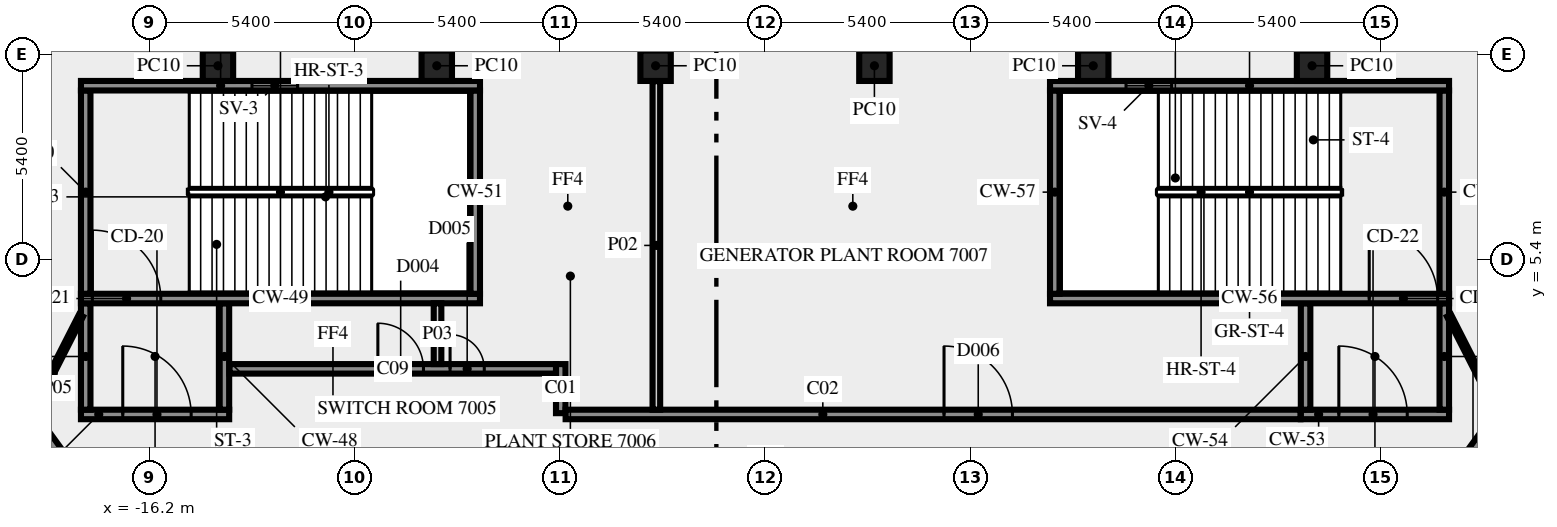
"""IFC4 building model, lengths in metres.
Left out: names, types, materials, properties, quantities, classifications, styles, units other than length and angle.
Written with IfcOpenShell. Run it as: python <this file> out.ifc"""

import sys

from ifc_helpers import new_model, si_unit, direction, frame, frame_2d, origin, origin_2d, place, context, subcontext, project, spatial, rectangle, extrude, element, fill, save


model = new_model("IFC4")
c1 = context("Model", 3, precision=1e-05, world=origin(), true_north=direction((0.0, 1.0)))
c2 = subcontext(c1, "Body", "Model", "MODEL_VIEW")
j1 = project(units=[si_unit("LENGTHUNIT", "METRE"), si_unit("PLANEANGLEUNIT", "RADIAN")], contexts=[c1])
p1 = place(None, origin())
s1 = spatial("IfcSite", under=j1, at=p1, CompositionType="ELEMENT")
p2 = place(p1, origin())
s2 = spatial("IfcBuilding", under=s1, at=p2, CompositionType="ELEMENT")
p3 = place(p2, frame((0.0, 0.0, 301.0)))
s3 = spatial("IfcBuildingStorey", under=s2, at=p3, CompositionType="ELEMENT", Elevation=301.0)
for number, where, z_axis, x_axis in (
    (1, (14.395, 10.5, 0.0), (0.0, 0.0, 1.0), (-1.0, 0.0, 0.0)),
    (2, (8.637, 10.5, 0.0), (0.0, 0.0, 1.0), (-1.0, 0.0, 0.0)),
    (3, (2.879, 10.5, 0.0), (0.0, 0.0, 1.0), (-1.0, 0.0, 0.0)),
    (4, (-2.879, 10.5, 0.0), (0.0, 0.0, 1.0), (-1.0, 0.0, 0.0)),
    (5, (-8.637, 10.5, 0.0), (0.0, 0.0, 1.0), (-1.0, 0.0, 0.0)),
    (6, (-14.395, 10.5, 0.0), (0.0, 0.0, 1.0), (-1.0, 0.0, 0.0)),
):
    element("IfcColumn", number, at=place(p3, frame(where, z_axis=z_axis, x_axis=x_axis)), inside=s3, PredefinedType="COLUMN", context=c2, shape_type="SweptSolid", body=[
        extrude(rectangle(XDim=0.8, YDim=0.8, at=origin_2d()), origin(), (0.0, 0.0, 1.0), 5.65),
    ])
p4 = place(p3, frame((-18.0, 1.325, 0.0), z_axis=(0.0, 0.0, 1.0), x_axis=(1.0, 0.0, 0.0)))
e7 = element("IfcWall", 7, at=p4, inside=s3, PredefinedType="SHEAR", context=c2, shape_type="SweptSolid", body=[
    extrude(rectangle(XDim=3.9, YDim=0.25, at=frame_2d((1.95, 0.0))), origin(), (0.0, 0.0, 1.0), 5.65),
])
p5 = place(p4, frame((1.1, 0.0, 0.0)))
e8 = element("IfcOpeningElement", 8, at=p5, cuts=e7, PredefinedType="OPENING", context=c2, shape_type="SweptSolid", body=[
    extrude(rectangle(XDim=1.8, YDim=2.1, at=frame_2d((0.9, 1.05))), frame((0.0, 0.135, 0.0), z_axis=(0.0, -1.0, 0.0), x_axis=(1.0, 0.0, 0.0)), (0.0, 0.0, 1.0), 0.27),
])
for number, where, z_axis, x_axis in (
    (9, (-17.875, 1.45, 0.0), (0.0, 0.0, 1.0), (0.0, 1.0, 0.0)),
    (10, (-14.225, 1.45, 0.0), (0.0, 0.0, 1.0), (0.0, 1.0, 0.0)),
):
    element("IfcWall", number, at=place(p3, frame(where, z_axis=z_axis, x_axis=x_axis)), inside=s3, PredefinedType="SHEAR", context=c2, shape_type="SweptSolid", body=[
        extrude(rectangle(XDim=2.8, YDim=0.25, at=frame_2d((1.4, 0.0))), origin(), (0.0, 0.0, 1.0), 5.65),
    ])
p6 = place(p3, frame((-18.0, 4.375, 0.0), z_axis=(0.0, 0.0, 1.0), x_axis=(1.0, 0.0, 0.0)))
e11 = element("IfcWall", 11, at=p6, inside=s3, PredefinedType="SHEAR", context=c2, shape_type="SweptSolid", body=[
    extrude(rectangle(XDim=10.5, YDim=0.25, at=frame_2d((5.25, 0.0))), origin(), (0.0, 0.0, 1.0), 5.65),
])
p7 = place(p6, frame((0.3, 0.0, 0.0)))
e12 = element("IfcOpeningElement", 12, at=p7, cuts=e11, PredefinedType="OPENING", context=c2, shape_type="SweptSolid", body=[
    extrude(rectangle(XDim=1.8, YDim=2.1, at=frame_2d((0.9, 1.05))), frame((0.0, 0.135, 0.0), z_axis=(0.0, -1.0, 0.0), x_axis=(1.0, 0.0, 0.0)), (0.0, 0.0, 1.0), 0.27),
])
for number, where, z_axis, x_axis in (
    (13, (-17.875, 4.5, 0.0), (0.0, 0.0, 1.0), (0.0, 1.0, 0.0)),
    (14, (-7.625, 4.5, 0.0), (0.0, 0.0, 1.0), (0.0, 1.0, 0.0)),
):
    element("IfcWall", number, at=place(p3, frame(where, z_axis=z_axis, x_axis=x_axis)), inside=s3, PredefinedType="SHEAR", context=c2, shape_type="SweptSolid", body=[
        extrude(rectangle(XDim=5.35, YDim=0.25, at=frame_2d((2.675, 0.0))), origin(), (0.0, 0.0, 1.0), 5.65),
    ])
p8 = place(p3, frame((-18.0, 9.975, 0.0), z_axis=(0.0, 0.0, 1.0), x_axis=(1.0, 0.0, 0.0)))
e15 = element("IfcWall", 15, at=p8, inside=s3, PredefinedType="SHEAR", context=c2, shape_type="SweptSolid", body=[
    extrude(rectangle(XDim=10.5, YDim=0.25, at=frame_2d((5.25, 0.0))), origin(), (0.0, 0.0, 1.0), 5.65),
])
p9 = place(p8, frame((4.5, 0.0, 1.0)))
e16 = element("IfcOpeningElement", 16, at=p9, cuts=e15, PredefinedType="OPENING", context=c2, shape_type="SweptSolid", body=[
    extrude(rectangle(XDim=1.2, YDim=1.2, at=frame_2d((0.6, 0.6))), frame((0.0, 0.135, 0.0), z_axis=(0.0, -1.0, 0.0), x_axis=(1.0, 0.0, 0.0)), (0.0, 0.0, 1.0), 0.27),
])
p10 = place(p3, frame((14.1, 1.325, 0.0), z_axis=(0.0, 0.0, 1.0), x_axis=(1.0, 0.0, 0.0)))
e17 = element("IfcWall", 17, at=p10, inside=s3, PredefinedType="SHEAR", context=c2, shape_type="SweptSolid", body=[
    extrude(rectangle(XDim=3.9, YDim=0.25, at=frame_2d((1.95, 0.0))), origin(), (0.0, 0.0, 1.0), 5.65),
])
p11 = place(p10, frame((1.0, 0.0, 0.0)))
e18 = element("IfcOpeningElement", 18, at=p11, cuts=e17, PredefinedType="OPENING", context=c2, shape_type="SweptSolid", body=[
    extrude(rectangle(XDim=1.8, YDim=2.1, at=frame_2d((0.9, 1.05))), frame((0.0, 0.135, 0.0), z_axis=(0.0, -1.0, 0.0), x_axis=(1.0, 0.0, 0.0)), (0.0, 0.0, 1.0), 0.27),
])
for number, where, z_axis, x_axis in (
    (19, (14.225, 1.45, 0.0), (0.0, 0.0, 1.0), (0.0, 1.0, 0.0)),
    (20, (17.875, 1.45, 0.0), (0.0, 0.0, 1.0), (0.0, 1.0, 0.0)),
):
    element("IfcWall", number, at=place(p3, frame(where, z_axis=z_axis, x_axis=x_axis)), inside=s3, PredefinedType="SHEAR", context=c2, shape_type="SweptSolid", body=[
        extrude(rectangle(XDim=2.8, YDim=0.25, at=frame_2d((1.4, 0.0))), origin(), (0.0, 0.0, 1.0), 5.65),
    ])
p12 = place(p3, frame((7.5, 4.375, 0.0), z_axis=(0.0, 0.0, 1.0), x_axis=(1.0, 0.0, 0.0)))
e21 = element("IfcWall", 21, at=p12, inside=s3, PredefinedType="SHEAR", context=c2, shape_type="SweptSolid", body=[
    extrude(rectangle(XDim=10.5, YDim=0.25, at=frame_2d((5.25, 0.0))), origin(), (0.0, 0.0, 1.0), 5.65),
])
p13 = place(p12, frame((8.4, 0.0, 0.0)))
e22 = element("IfcOpeningElement", 22, at=p13, cuts=e21, PredefinedType="OPENING", context=c2, shape_type="SweptSolid", body=[
    extrude(rectangle(XDim=1.8, YDim=2.1, at=frame_2d((0.9, 1.05))), frame((0.0, 0.135, 0.0), z_axis=(0.0, -1.0, 0.0), x_axis=(1.0, 0.0, 0.0)), (0.0, 0.0, 1.0), 0.27),
])
for number, where, z_axis, x_axis in (
    (23, (7.625, 4.5, 0.0), (0.0, 0.0, 1.0), (0.0, 1.0, 0.0)),
    (24, (17.875, 4.5, 0.0), (0.0, 0.0, 1.0), (0.0, 1.0, 0.0)),
):
    element("IfcWall", number, at=place(p3, frame(where, z_axis=z_axis, x_axis=x_axis)), inside=s3, PredefinedType="SHEAR", context=c2, shape_type="SweptSolid", body=[
        extrude(rectangle(XDim=5.35, YDim=0.25, at=frame_2d((2.675, 0.0))), origin(), (0.0, 0.0, 1.0), 5.65),
    ])
p14 = place(p3, frame((7.5, 9.975, 0.0), z_axis=(0.0, 0.0, 1.0), x_axis=(1.0, 0.0, 0.0)))
e25 = element("IfcWall", 25, at=p14, inside=s3, PredefinedType="SHEAR", context=c2, shape_type="SweptSolid", body=[
    extrude(rectangle(XDim=10.5, YDim=0.25, at=frame_2d((5.25, 0.0))), origin(), (0.0, 0.0, 1.0), 5.65),
])
p15 = place(p14, frame((2.0, 0.0, 1.0)))
e26 = element("IfcOpeningElement", 26, at=p15, cuts=e25, PredefinedType="OPENING", context=c2, shape_type="SweptSolid", body=[
    extrude(rectangle(XDim=1.2, YDim=1.2, at=frame_2d((0.6, 0.6))), frame((0.0, 0.135, 0.0), z_axis=(0.0, -1.0, 0.0), x_axis=(1.0, 0.0, 0.0)), (0.0, 0.0, 1.0), 0.27),
])
p16 = place(p3, frame((-5.375, 2.65, 0.0), z_axis=(0.0, 0.0, 1.0), x_axis=(0.0, -1.0, 0.0)))
e27 = element("IfcWall", 27, at=p16, inside=s3, PredefinedType="SOLIDWALL", context=c2, shape_type="SweptSolid", body=[
    extrude(rectangle(XDim=1.291, YDim=0.25, at=frame_2d((0.646, 0.0))), origin(), (0.0, 0.0, 1.0), 5.65),
])
p17 = place(p3, frame((-5.246, 1.325, 0.0), z_axis=(0.0, 0.0, 1.0), x_axis=(1.0, 0.0, 0.0)))
e28 = element("IfcWall", 28, at=p17, inside=s3, PredefinedType="SOLIDWALL", context=c2, shape_type="SweptSolid", body=[
    extrude(rectangle(XDim=19.336, YDim=0.25, at=frame_2d((9.668, 0.0))), origin(), (0.0, 0.0, 1.0), 5.65),
])
p18 = place(p17, frame((9.957, 0.0, 0.0)))
e29 = element("IfcOpeningElement", 29, at=p18, cuts=e28, PredefinedType="OPENING", context=c2, shape_type="SweptSolid", body=[
    extrude(rectangle(XDim=1.8, YDim=2.1, at=frame_2d((0.9, 1.05))), frame((0.0, 0.135, 0.0), z_axis=(0.0, -1.0, 0.0), x_axis=(1.0, 0.0, 0.0)), (0.0, 0.0, 1.0), 0.27),
])
p19 = place(p3, frame((17.545, -1.125, 0.0), z_axis=(0.0, 0.0, 1.0), x_axis=(0.587789755823, 0.80901372235, 0.0)))
e30 = element("IfcWall", 30, at=p19, inside=s3, PredefinedType="SOLIDWALL", context=c2, shape_type="SweptSolid", body=[
    extrude(rectangle(XDim=23.645, YDim=0.25, at=frame_2d((11.822, 0.0))), origin(), (0.0, 0.0, 1.0), 5.65),
])
p20 = place(p19, frame((21.303, 0.0, 0.0)))
e31 = element("IfcOpeningElement", 31, at=p20, cuts=e30, PredefinedType="OPENING", context=c2, shape_type="SweptSolid", body=[
    extrude(rectangle(XDim=1.2, YDim=2.1, at=frame_2d((0.6, 1.05))), frame((0.0, 0.135, 0.0), z_axis=(0.0, -1.0, 0.0), x_axis=(1.0, 0.0, 0.0)), (0.0, 0.0, 1.0), 0.27),
])
p21 = place(p3, frame((-31.387, 17.927, 0.0), z_axis=(0.0, 0.0, 1.0), x_axis=(0.587788830132, -0.80901439491, 0.0)))
e32 = element("IfcWall", 32, at=p21, inside=s3, PredefinedType="SOLIDWALL", context=c2, shape_type="SweptSolid", body=[
    extrude(rectangle(XDim=23.549, YDim=0.25, at=frame_2d((11.775, 0.0))), origin(), (0.0, 0.0, 1.0), 5.65),
])
p22 = place(p21, frame((1.046, 0.0, 0.0)))
e33 = element("IfcOpeningElement", 33, at=p22, cuts=e32, PredefinedType="OPENING", context=c2, shape_type="SweptSolid", body=[
    extrude(rectangle(XDim=1.2, YDim=2.1, at=frame_2d((0.6, 1.05))), frame((0.0, 0.135, 0.0), z_axis=(0.0, -1.0, 0.0), x_axis=(1.0, 0.0, 0.0)), (0.0, 0.0, 1.0), 0.27),
])
p23 = place(p3, frame((-14.09, 2.525, 0.0), z_axis=(0.0, 0.0, 1.0), x_axis=(1.0, 0.0, 0.0)))
e34 = element("IfcWall", 34, at=p23, inside=s3, PredefinedType="SOLIDWALL", context=c2, shape_type="SweptSolid", body=[
    extrude(rectangle(XDim=8.59, YDim=0.25, at=frame_2d((4.295, 0.0))), origin(), (0.0, 0.0, 1.0), 5.65),
])
p24 = place(p23, frame((5.803, 0.0, 0.0)))
e35 = element("IfcOpeningElement", 35, at=p24, cuts=e34, PredefinedType="OPENING", context=c2, shape_type="SweptSolid", body=[
    extrude(rectangle(XDim=0.9, YDim=2.1, at=frame_2d((0.45, 1.05))), frame((0.0, 0.135, 0.0), z_axis=(0.0, -1.0, 0.0), x_axis=(1.0, 0.0, 0.0)), (0.0, 0.0, 1.0), 0.27),
])
p25 = place(p23, frame((3.903, 0.0, 0.0)))
e36 = element("IfcOpeningElement", 36, at=p25, cuts=e34, PredefinedType="OPENING", context=c2, shape_type="SweptSolid", body=[
    extrude(rectangle(XDim=1.2, YDim=2.1, at=frame_2d((0.6, 1.05))), frame((0.0, 0.135, 0.0), z_axis=(0.0, -1.0, 0.0), x_axis=(1.0, 0.0, 0.0)), (0.0, 0.0, 1.0), 0.27),
])
p26 = place(p3, frame((-2.859, 10.095, 0.0), z_axis=(0.0, 0.0, 1.0), x_axis=(0.0, -1.0, 0.0)))
e37 = element("IfcWall", 37, at=p26, inside=s3, PredefinedType="SOLIDWALL", context=c2, shape_type="SweptSolid", body=[
    extrude(rectangle(XDim=8.645, YDim=0.2, at=frame_2d((4.323, 0.0))), origin(), (0.0, 0.0, 1.0), 5.65),
])
p27 = place(p3, frame((-8.617, 4.25, 0.0), z_axis=(0.0, 0.0, 1.0), x_axis=(0.0, -1.0, 0.0)))
e38 = element("IfcWall", 38, at=p27, inside=s3, PredefinedType="SOLIDWALL", context=c2, shape_type="SweptSolid", body=[
    extrude(rectangle(XDim=1.6, YDim=0.2, at=frame_2d((0.8, 0.0))), origin(), (0.0, 0.0, 1.0), 5.65),
])
for number, where, z_axis, x_axis in (
    (39, (18.0, 3.925, 0.0), (0.0, 0.0, 1.0), (0.454, -0.891, 0.0)),
    (40, (-19.261, 1.45, 0.0), (0.0, 0.0, 1.0), (0.454, 0.891, 0.0)),
):
    element("IfcWall", number, at=place(p3, frame(where, z_axis=z_axis, x_axis=x_axis)), inside=s3, PredefinedType="PARTITIONING", context=c2, shape_type="SweptSolid", body=[
        extrude(rectangle(XDim=2.778, YDim=0.12, at=frame_2d((1.389, 0.0))), origin(), (0.0, 0.0, 1.0), 5.65),
    ])
p28 = place(p5, origin())
e41 = element("IfcDoor", 41, at=p28, inside=s3, OperationType="DOUBLE_DOOR_SINGLE_SWING", PredefinedType="DOOR", context=c2, shape_type="SweptSolid", body=[
    extrude(rectangle(XDim=1.8, YDim=2.1, at=frame_2d((0.9, 1.05))), frame((0.0, 0.025, 0.0), z_axis=(0.0, -1.0, 0.0), x_axis=(1.0, 0.0, 0.0)), (0.0, 0.0, 1.0), 0.05),
])
fill(e8, e41)
p29 = place(p7, origin())
e42 = element("IfcDoor", 42, at=p29, inside=s3, OperationType="DOUBLE_DOOR_SINGLE_SWING", PredefinedType="DOOR", context=c2, shape_type="SweptSolid", body=[
    extrude(rectangle(XDim=1.8, YDim=2.1, at=frame_2d((0.9, 1.05))), frame((0.0, 0.025, 0.0), z_axis=(0.0, -1.0, 0.0), x_axis=(1.0, 0.0, 0.0)), (0.0, 0.0, 1.0), 0.05),
])
fill(e12, e42)
p30 = place(p9, origin())
e43 = element("IfcWindow", 43, at=p30, inside=s3, PartitioningType="SINGLE_PANEL", PredefinedType="WINDOW", context=c2, shape_type="SweptSolid", body=[
    extrude(rectangle(XDim=1.2, YDim=1.2, at=frame_2d((0.6, 0.6))), frame((0.0, 0.03, 0.0), z_axis=(0.0, -1.0, 0.0), x_axis=(1.0, 0.0, 0.0)), (0.0, 0.0, 1.0), 0.06),
])
fill(e16, e43)
p31 = place(p11, origin())
e44 = element("IfcDoor", 44, at=p31, inside=s3, OperationType="DOUBLE_DOOR_SINGLE_SWING", PredefinedType="DOOR", context=c2, shape_type="SweptSolid", body=[
    extrude(rectangle(XDim=1.8, YDim=2.1, at=frame_2d((0.9, 1.05))), frame((0.0, 0.025, 0.0), z_axis=(0.0, -1.0, 0.0), x_axis=(1.0, 0.0, 0.0)), (0.0, 0.0, 1.0), 0.05),
])
fill(e18, e44)
p32 = place(p13, origin())
e45 = element("IfcDoor", 45, at=p32, inside=s3, OperationType="DOUBLE_DOOR_SINGLE_SWING", PredefinedType="DOOR", context=c2, shape_type="SweptSolid", body=[
    extrude(rectangle(XDim=1.8, YDim=2.1, at=frame_2d((0.9, 1.05))), frame((0.0, 0.025, 0.0), z_axis=(0.0, -1.0, 0.0), x_axis=(1.0, 0.0, 0.0)), (0.0, 0.0, 1.0), 0.05),
])
fill(e22, e45)
p33 = place(p15, origin())
e46 = element("IfcWindow", 46, at=p33, inside=s3, PartitioningType="SINGLE_PANEL", PredefinedType="WINDOW", context=c2, shape_type="SweptSolid", body=[
    extrude(rectangle(XDim=1.2, YDim=1.2, at=frame_2d((0.6, 0.6))), frame((0.0, 0.03, 0.0), z_axis=(0.0, -1.0, 0.0), x_axis=(1.0, 0.0, 0.0)), (0.0, 0.0, 1.0), 0.06),
])
fill(e26, e46)
p34 = place(p18, origin())
e47 = element("IfcDoor", 47, at=p34, inside=s3, OperationType="DOUBLE_DOOR_SINGLE_SWING", PredefinedType="DOOR", context=c2, shape_type="SweptSolid", body=[
    extrude(rectangle(XDim=1.8, YDim=2.1, at=frame_2d((0.9, 1.05))), frame((0.0, 0.025, 0.0), z_axis=(0.0, -1.0, 0.0), x_axis=(1.0, 0.0, 0.0)), (0.0, 0.0, 1.0), 0.05),
])
fill(e29, e47)
p35 = place(p24, origin())
e48 = element("IfcDoor", 48, at=p35, inside=s3, OperationType="SINGLE_SWING_LEFT", PredefinedType="DOOR", context=c2, shape_type="SweptSolid", body=[
    extrude(rectangle(XDim=0.9, YDim=2.1, at=frame_2d((0.45, 1.05))), frame((0.0, 0.025, 0.0), z_axis=(0.0, -1.0, 0.0), x_axis=(1.0, 0.0, 0.0)), (0.0, 0.0, 1.0), 0.05),
])
fill(e35, e48)
p36 = place(p25, origin())
e49 = element("IfcDoor", 49, at=p36, inside=s3, OperationType="SINGLE_SWING_RIGHT", PredefinedType="DOOR", context=c2, shape_type="SweptSolid", body=[
    extrude(rectangle(XDim=1.2, YDim=2.1, at=frame_2d((0.6, 1.05))), frame((0.0, 0.025, 0.0), z_axis=(0.0, -1.0, 0.0), x_axis=(1.0, 0.0, 0.0)), (0.0, 0.0, 1.0), 0.05),
])
fill(e36, e49)
save(model, sys.argv[1])
